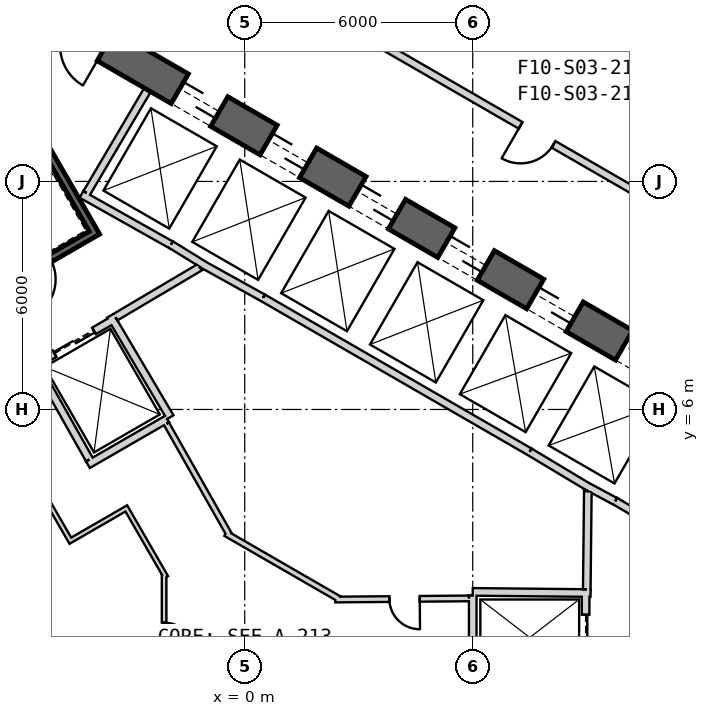
"""IFC4 building model, lengths in metres.
Left out: names, types, materials, properties, quantities, classifications, styles, units other than length and angle.
Written with IfcOpenShell. Run it as: python <this file> out.ifc"""

import sys

from ifc_helpers import new_model, si_unit, direction, frame, frame_2d, origin, place, context, subcontext, project, spatial, rectangle, extrude, element, fill, save


model = new_model("IFC4")
c1 = context("Model", 3, precision=1e-05, world=origin(), true_north=direction((0.0, 1.0)))
c2 = subcontext(c1, "Body", "Model", "MODEL_VIEW")
j1 = project(units=[si_unit("LENGTHUNIT", "METRE"), si_unit("PLANEANGLEUNIT", "RADIAN")], contexts=[c1])
p1 = place(None, origin())
s1 = spatial("IfcSite", under=j1, at=p1, CompositionType="ELEMENT")
p2 = place(p1, origin())
s2 = spatial("IfcBuilding", under=s1, at=p2, CompositionType="ELEMENT")
p3 = place(p2, frame((0.0, 0.0, 82.4)))
s3 = spatial("IfcBuildingStorey", under=s2, at=p3, CompositionType="ELEMENT", Elevation=82.4)
p4 = place(p3, frame((19.475, 2.208, 0.0), z_axis=(0.0, 0.0, 1.0), x_axis=(-0.866028369851, 0.499994862586, 0.0)))
e1 = element("IfcWall", 1, at=p4, inside=s3, PredefinedType="SHEAR", context=c2, shape_type="SweptSolid", body=[
    extrude(rectangle(XDim=31.523, YDim=0.9, at=frame_2d((15.762, 0.0))), origin(), (0.0, 0.0, 1.0), 4.1),
])
p5 = place(p4, frame((7.062, 0.0, 0.0)))
e2 = element("IfcOpeningElement", 2, at=p5, cuts=e1, PredefinedType="OPENING", context=c2, shape_type="SweptSolid", body=[
    extrude(rectangle(XDim=1.2, YDim=2.4, at=frame_2d((0.6, 1.2))), frame((0.0, 0.46, 0.0), z_axis=(0.0, -1.0, 0.0), x_axis=(1.0, 0.0, 0.0)), (0.0, 0.0, 1.0), 0.92),
])
p6 = place(p4, frame((9.762, 0.0, 0.0)))
e3 = element("IfcOpeningElement", 3, at=p6, cuts=e1, PredefinedType="OPENING", context=c2, shape_type="SweptSolid", body=[
    extrude(rectangle(XDim=1.2, YDim=2.4, at=frame_2d((0.6, 1.2))), frame((0.0, 0.46, 0.0), z_axis=(0.0, -1.0, 0.0), x_axis=(1.0, 0.0, 0.0)), (0.0, 0.0, 1.0), 0.92),
])
p7 = place(p4, frame((12.462, 0.0, 0.0)))
e4 = element("IfcOpeningElement", 4, at=p7, cuts=e1, PredefinedType="OPENING", context=c2, shape_type="SweptSolid", body=[
    extrude(rectangle(XDim=1.2, YDim=2.4, at=frame_2d((0.6, 1.2))), frame((0.0, 0.46, 0.0), z_axis=(0.0, -1.0, 0.0), x_axis=(1.0, 0.0, 0.0)), (0.0, 0.0, 1.0), 0.92),
])
p8 = place(p4, frame((15.162, 0.0, 0.0)))
e5 = element("IfcOpeningElement", 5, at=p8, cuts=e1, PredefinedType="OPENING", context=c2, shape_type="SweptSolid", body=[
    extrude(rectangle(XDim=1.2, YDim=2.4, at=frame_2d((0.6, 1.2))), frame((0.0, 0.46, 0.0), z_axis=(0.0, -1.0, 0.0), x_axis=(1.0, 0.0, 0.0)), (0.0, 0.0, 1.0), 0.92),
])
p9 = place(p4, frame((17.862, 0.0, 0.0)))
e6 = element("IfcOpeningElement", 6, at=p9, cuts=e1, PredefinedType="OPENING", context=c2, shape_type="SweptSolid", body=[
    extrude(rectangle(XDim=1.2, YDim=2.4, at=frame_2d((0.6, 1.2))), frame((0.0, 0.46, 0.0), z_axis=(0.0, -1.0, 0.0), x_axis=(1.0, 0.0, 0.0)), (0.0, 0.0, 1.0), 0.92),
])
p10 = place(p4, frame((20.562, 0.0, 0.0)))
e7 = element("IfcOpeningElement", 7, at=p10, cuts=e1, PredefinedType="OPENING", context=c2, shape_type="SweptSolid", body=[
    extrude(rectangle(XDim=1.2, YDim=2.4, at=frame_2d((0.6, 1.2))), frame((0.0, 0.46, 0.0), z_axis=(0.0, -1.0, 0.0), x_axis=(1.0, 0.0, 0.0)), (0.0, 0.0, 1.0), 0.92),
])
p11 = place(p4, frame((23.262, 0.0, 0.0)))
e8 = element("IfcOpeningElement", 8, at=p11, cuts=e1, PredefinedType="OPENING", context=c2, shape_type="SweptSolid", body=[
    extrude(rectangle(XDim=1.2, YDim=2.4, at=frame_2d((0.6, 1.2))), frame((0.0, 0.46, 0.0), z_axis=(0.0, -1.0, 0.0), x_axis=(1.0, 0.0, 0.0)), (0.0, 0.0, 1.0), 0.92),
])
p12 = place(p4, frame((3.612, 0.0, 0.0)))
e9 = element("IfcOpeningElement", 9, at=p12, cuts=e1, PredefinedType="OPENING", context=c2, shape_type="SweptSolid", body=[
    extrude(rectangle(XDim=1.2, YDim=2.4, at=frame_2d((0.6, 1.2))), frame((0.0, 0.46, 0.0), z_axis=(0.0, -1.0, 0.0), x_axis=(1.0, 0.0, 0.0)), (0.0, 0.0, 1.0), 0.92),
])
p13 = place(p4, frame((26.712, 0.0, 0.0)))
e10 = element("IfcOpeningElement", 10, at=p13, cuts=e1, PredefinedType="OPENING", context=c2, shape_type="SweptSolid", body=[
    extrude(rectangle(XDim=1.2, YDim=2.4, at=frame_2d((0.6, 1.2))), frame((0.0, 0.46, 0.0), z_axis=(0.0, -1.0, 0.0), x_axis=(1.0, 0.0, 0.0)), (0.0, 0.0, 1.0), 0.92),
])
p14 = place(p3, frame((7.497, 4.886, 0.0), z_axis=(0.0, 0.0, 1.0), x_axis=(-0.866030989016, 0.499990325971, 0.0)))
e11 = element("IfcWall", 11, at=p14, inside=s3, PredefinedType="PLUMBINGWALL", context=c2, shape_type="SweptSolid", body=[
    extrude(rectangle(XDim=8.1, YDim=0.2, at=frame_2d((4.05, 0.0))), origin(), (0.0, 0.0, 1.0), 3.8),
])
p15 = place(p3, frame((12.073, 2.211, 0.0), z_axis=(0.0, 0.0, 1.0), x_axis=(-0.860438357912, 0.509554542943, 0.0)))
e12 = element("IfcWall", 12, at=p15, inside=s3, PredefinedType="PLUMBINGWALL", context=c2, shape_type="SweptSolid", body=[
    extrude(rectangle(XDim=2.7, YDim=0.2, at=frame_2d((1.35, 0.0))), origin(), (0.0, 0.0, 1.0), 3.8),
])
p16 = place(p3, frame((9.748, 3.583, 0.0), z_axis=(0.0, 0.0, 1.0), x_axis=(-0.880917147855, 0.473270513147, 0.0)))
e13 = element("IfcWall", 13, at=p16, inside=s3, PredefinedType="PLUMBINGWALL", context=c2, shape_type="SweptSolid", body=[
    extrude(rectangle(XDim=0.878, YDim=0.2, at=frame_2d((0.439, 0.0))), origin(), (0.0, 0.0, 1.0), 3.8),
])
p17 = place(p3, frame((9.079, 3.937, 0.0), z_axis=(0.0, 0.0, 1.0), x_axis=(-0.857516281273, 0.51445682749, 0.0)))
e14 = element("IfcWall", 14, at=p17, inside=s3, PredefinedType="PLUMBINGWALL", context=c2, shape_type="SweptSolid", body=[
    extrude(rectangle(XDim=1.845, YDim=0.2, at=frame_2d((0.922, 0.0))), origin(), (0.0, 0.0, 1.0), 3.8),
])
p18 = place(p3, frame((-1.941, 10.339, 0.0), z_axis=(0.0, 0.0, 1.0), x_axis=(0.850216889117, -0.526432561171, 0.0)))
e15 = element("IfcWall", 15, at=p18, inside=s3, PredefinedType="PLUMBINGWALL", context=c2, shape_type="SweptSolid", body=[
    extrude(rectangle(XDim=1.078, YDim=0.2, at=frame_2d((0.539, 0.0))), origin(), (0.0, 0.0, 1.0), 3.8),
])
p19 = place(p3, frame((0.483, 8.936, 0.0), z_axis=(0.0, 0.0, 1.0), x_axis=(-0.874269620932, 0.485440655401, 0.0)))
e16 = element("IfcWall", 16, at=p19, inside=s3, PredefinedType="PLUMBINGWALL", context=c2, shape_type="SweptSolid", body=[
    extrude(rectangle(XDim=1.845, YDim=0.2, at=frame_2d((0.922, 0.0))), origin(), (0.0, 0.0, 1.0), 3.8),
])
p20 = place(p3, frame((-4.296, 11.659, 0.0), z_axis=(0.0, 0.0, 1.0), x_axis=(0.871534483978, -0.490334215854, 0.0)))
e17 = element("IfcWall", 17, at=p20, inside=s3, PredefinedType="PLUMBINGWALL", context=c2, shape_type="SweptSolid", body=[
    extrude(rectangle(XDim=2.7, YDim=0.2, at=frame_2d((1.35, 0.0))), origin(), (0.0, 0.0, 1.0), 3.8),
])
p21 = place(p3, frame((-4.158, 11.696, 0.0), z_axis=(0.0, 0.0, 1.0), x_axis=(0.508018930956, 0.861345903683, 0.0)))
e18 = element("IfcWall", 18, at=p21, inside=s3, PredefinedType="PLUMBINGWALL", context=c2, shape_type="SweptSolid", body=[
    extrude(rectangle(XDim=3.15, YDim=0.2, at=frame_2d((1.575, 0.0))), origin(), (0.0, 0.0, 1.0), 3.8),
])
p22 = place(p3, frame((8.97, 1.2, 0.0), z_axis=(0.0, 0.0, 1.0), x_axis=(0.0, -1.0, 0.0)))
e19 = element("IfcWall", 19, at=p22, inside=s3, PredefinedType="PLUMBINGWALL", context=c2, shape_type="SweptSolid", body=[
    extrude(rectangle(XDim=2.4, YDim=0.2, at=frame_2d((1.2, 0.0))), origin(), (0.0, 0.0, 1.0), 3.8),
])
p23 = place(p22, frame((0.6, 0.0, 0.0)))
e20 = element("IfcOpeningElement", 20, at=p23, cuts=e19, PredefinedType="OPENING", context=c2, shape_type="SweptSolid", body=[
    extrude(rectangle(XDim=1.2, YDim=2.4, at=frame_2d((0.6, 1.2))), frame((0.0, 0.11, 0.0), z_axis=(0.0, -1.0, 0.0), x_axis=(1.0, 0.0, 0.0)), (0.0, 0.0, 1.0), 0.22),
])
p24 = place(p3, frame((6.0, 1.2, 0.0), z_axis=(0.0, 0.0, 1.0), x_axis=(0.999949988, -0.010001074852, 0.0)))
e21 = element("IfcWall", 21, at=p24, inside=s3, PredefinedType="PLUMBINGWALL", context=c2, shape_type="SweptSolid", body=[
    extrude(rectangle(XDim=3.1, YDim=0.2, at=frame_2d((1.55, 0.0))), origin(), (0.0, 0.0, 1.0), 3.8),
])
p25 = place(p3, frame((6.0, -1.1, 0.0), z_axis=(0.0, 0.0, 1.0), x_axis=(0.0, 1.0, 0.0)))
e22 = element("IfcWall", 22, at=p25, inside=s3, PredefinedType="PLUMBINGWALL", context=c2, shape_type="SweptSolid", body=[
    extrude(rectangle(XDim=2.205, YDim=0.2, at=frame_2d((1.102, 0.0))), origin(), (0.0, 0.0, 1.0), 3.8),
])
p26 = place(p3, frame((-7.854, 17.405, -0.3), z_axis=(0.0, 0.0, 1.0), x_axis=(0.499997992926, -0.866026562566, 0.0)))
e23 = element("IfcWall", 23, at=p26, inside=s3, PredefinedType="SHEAR", context=c2, shape_type="SweptSolid", body=[
    extrude(rectangle(XDim=7.9, YDim=0.2, at=frame_2d((3.95, 0.0))), origin(), (0.0, 0.0, 1.0), 4.1),
])
p27 = place(p3, frame((-7.159, 8.8, -0.3), z_axis=(0.0, 0.0, 1.0), x_axis=(0.866047807691, 0.499961193289, 0.0)))
e24 = element("IfcWall", 24, at=p27, inside=s3, PredefinedType="SHEAR", context=c2, shape_type="SweptSolid", body=[
    extrude(rectangle(XDim=3.6, YDim=0.2, at=frame_2d((1.8, 0.0))), origin(), (0.0, 0.0, 1.0), 4.1),
])
p28 = place(p27, frame((1.25, 0.0, 0.3)))
e25 = element("IfcOpeningElement", 25, at=p28, cuts=e24, PredefinedType="OPENING", context=c2, shape_type="SweptSolid", body=[
    extrude(rectangle(XDim=1.1, YDim=2.1, at=frame_2d((0.55, 1.05))), frame((0.0, 0.11, 0.0), z_axis=(0.0, -1.0, 0.0), x_axis=(1.0, 0.0, 0.0)), (0.0, 0.0, 1.0), 0.22),
])
p29 = place(p3, frame((-5.524, 7.168, 0.0), z_axis=(0.0, 0.0, 1.0), x_axis=(0.866024647952, 0.500001309137, 0.0)))
e26 = element("IfcWall", 26, at=p29, inside=s3, PredefinedType="PLUMBINGWALL", context=c2, shape_type="SweptSolid", body=[
    extrude(rectangle(XDim=2.4, YDim=0.2, at=frame_2d((1.2, 0.0))), origin(), (0.0, 0.0, 1.0), 3.8),
])
p30 = place(p29, frame((0.6, 0.0, 0.0)))
e27 = element("IfcOpeningElement", 27, at=p30, cuts=e26, PredefinedType="OPENING", context=c2, shape_type="SweptSolid", body=[
    extrude(rectangle(XDim=1.2, YDim=2.4, at=frame_2d((0.6, 1.2))), frame((0.0, 0.11, 0.0), z_axis=(0.0, -1.0, 0.0), x_axis=(1.0, 0.0, 0.0)), (0.0, 0.0, 1.0), 0.22),
])
p31 = place(p3, frame((-3.538, 8.465, 0.0), z_axis=(0.0, 0.0, 1.0), x_axis=(0.508647062354, -0.860975125052, 0.0)))
e28 = element("IfcWall", 28, at=p31, inside=s3, PredefinedType="PLUMBINGWALL", context=c2, shape_type="SweptSolid", body=[
    extrude(rectangle(XDim=3.1, YDim=0.2, at=frame_2d((1.55, 0.0))), origin(), (0.0, 0.0, 1.0), 3.8),
])
p32 = place(p3, frame((-2.043, 5.748, 0.0), z_axis=(0.0, 0.0, 1.0), x_axis=(-0.866035096217, -0.499983211839, 0.0)))
e29 = element("IfcWall", 29, at=p32, inside=s3, PredefinedType="PLUMBINGWALL", context=c2, shape_type="SweptSolid", body=[
    extrude(rectangle(XDim=2.404, YDim=0.2, at=frame_2d((1.202, 0.0))), origin(), (0.0, 0.0, 1.0), 3.8),
])
p33 = place(p3, frame((-5.562, 7.296, 0.0), z_axis=(0.0, 0.0, 1.0), x_axis=(0.49134651263, -0.870964180966, 0.0)))
e30 = element("IfcWall", 30, at=p33, inside=s3, PredefinedType="PLUMBINGWALL", context=c2, shape_type="SweptSolid", body=[
    extrude(rectangle(XDim=3.0, YDim=0.2, at=frame_2d((1.5, 0.0))), origin(), (0.0, 0.0, 1.0), 3.8),
])
p34 = place(p3, frame((9.001, 1.27, 0.0), z_axis=(0.0, 0.0, 1.0), x_axis=(0.010784614026, 0.999941844359, 0.0)))
e31 = element("IfcWall", 31, at=p34, inside=s3, PredefinedType="PARTITIONING", context=c2, shape_type="SweptSolid", body=[
    extrude(rectangle(XDim=2.581, YDim=0.2, at=frame_2d((1.291, 0.0))), origin(), (0.0, 0.0, 1.0), 3.8),
])
p35 = place(p3, frame((-1.18, 9.744, 0.0), z_axis=(0.0, 0.0, 1.0), x_axis=(-0.860615607571, -0.509255118781, 0.0)))
e32 = element("IfcWall", 32, at=p35, inside=s3, PredefinedType="PARTITIONING", context=c2, shape_type="SweptSolid", body=[
    extrude(rectangle(XDim=2.581, YDim=0.2, at=frame_2d((1.29, 0.0))), origin(), (0.0, 0.0, 1.0), 3.8),
])
p36 = place(p3, frame((2.384, 0.999, 0.0), z_axis=(0.0, 0.0, 1.0), x_axis=(0.999964703434, 0.008401897723, 0.0)))
e33 = element("IfcWall", 33, at=p36, inside=s3, PredefinedType="PLUMBINGWALL", context=c2, shape_type="SweptSolid", body=[
    extrude(rectangle(XDim=3.516, YDim=0.15, at=frame_2d((1.758, 0.0))), origin(), (0.0, 0.0, 1.0), 3.8),
])
p37 = place(p36, frame((1.422, 0.0, 0.0)))
e34 = element("IfcOpeningElement", 34, at=p37, cuts=e33, PredefinedType="OPENING", context=c2, shape_type="SweptSolid", body=[
    extrude(rectangle(XDim=0.8, YDim=2.1, at=frame_2d((0.4, 1.05))), frame((0.0, 0.085, 0.0), z_axis=(0.0, -1.0, 0.0), x_axis=(1.0, 0.0, 0.0)), (0.0, 0.0, 1.0), 0.17),
])
p38 = place(p3, frame((-0.5, 2.739, 0.0), z_axis=(0.0, 0.0, 1.0), x_axis=(0.866029020252, -0.499993736042, 0.0)))
e35 = element("IfcWall", 35, at=p38, inside=s3, PredefinedType="PLUMBINGWALL", context=c2, shape_type="SweptSolid", body=[
    extrude(rectangle(XDim=3.454, YDim=0.15, at=frame_2d((1.727, 0.0))), origin(), (0.0, 0.0, 1.0), 3.8),
])
p39 = place(p3, frame((-2.059, 5.624, 0.0), z_axis=(0.0, 0.0, 1.0), x_axis=(0.49265005812, -0.870227510617, 0.0)))
e36 = element("IfcWall", 36, at=p39, inside=s3, PredefinedType="PLUMBINGWALL", context=c2, shape_type="SweptSolid", body=[
    extrude(rectangle(XDim=3.365, YDim=0.15, at=frame_2d((1.683, 0.0))), origin(), (0.0, 0.0, 1.0), 3.8),
])
p40 = place(p3, frame((-4.558, 2.495, 0.0), z_axis=(0.0, 0.0, 1.0), x_axis=(-0.499991792115, 0.866030142557, 0.0)))
e37 = element("IfcWall", 37, at=p40, inside=s3, PredefinedType="PARTITIONING", context=c2, shape_type="SweptSolid", body=[
    extrude(rectangle(XDim=3.06, YDim=0.12, at=frame_2d((1.53, 0.0))), origin(), (0.0, 0.0, 1.0), 3.8),
])
p41 = place(p3, frame((-3.064, 3.427, 0.0), z_axis=(0.0, 0.0, 1.0), x_axis=(-0.866087547558, -0.499892348375, 0.0)))
e38 = element("IfcWall", 38, at=p41, inside=s3, PredefinedType="PARTITIONING", context=c2, shape_type="SweptSolid", body=[
    extrude(rectangle(XDim=1.7, YDim=0.12, at=frame_2d((0.85, 0.0))), origin(), (0.0, 0.0, 1.0), 3.8),
])
p42 = place(p3, frame((-2.07, 1.585, 0.0), z_axis=(0.0, 0.0, 1.0), x_axis=(-0.499937346687, 0.86606157367, 0.0)))
e39 = element("IfcWall", 39, at=p42, inside=s3, PredefinedType="PARTITIONING", context=c2, shape_type="SweptSolid", body=[
    extrude(rectangle(XDim=2.032, YDim=0.12, at=frame_2d((1.016, 0.0))), origin(), (0.0, 0.0, 1.0), 3.8),
])
p43 = place(p3, frame((-2.122, -1.779, 0.0), z_axis=(0.0, 0.0, 1.0), x_axis=(0.0, 1.0, 0.0)))
e40 = element("IfcWall", 40, at=p43, inside=s3, PredefinedType="PARTITIONING", context=c2, shape_type="SweptSolid", body=[
    extrude(rectangle(XDim=3.435, YDim=0.12, at=frame_2d((1.718, 0.0))), origin(), (0.0, 0.0, 1.0), 3.8),
])
p44 = place(p43, frame((1.37, 0.0, 0.0)))
e41 = element("IfcOpeningElement", 41, at=p44, cuts=e40, PredefinedType="OPENING", context=c2, shape_type="SweptSolid", body=[
    extrude(rectangle(XDim=0.8, YDim=2.1, at=frame_2d((0.4, 1.05))), frame((0.0, 0.07, 0.0), z_axis=(0.0, -1.0, 0.0), x_axis=(1.0, 0.0, 0.0)), (0.0, 0.0, 1.0), 0.14),
])
p45 = place(p3, frame((21.944, 4.998, 0.0), z_axis=(0.0, 0.0, 1.0), x_axis=(-0.866025615729, 0.499999632902, 0.0)))
e42 = element("IfcWall", 42, at=p45, inside=s3, PredefinedType="PARTITIONING", context=c2, shape_type="SweptSolid", body=[
    extrude(rectangle(XDim=32.811, YDim=0.2, at=frame_2d((16.405, 0.0))), origin(), (0.0, 0.0, 1.0), 2.98),
])
p46 = place(p45, frame((15.955, 0.0, 0.0)))
e43 = element("IfcOpeningElement", 43, at=p46, cuts=e42, PredefinedType="OPENING", context=c2, shape_type="SweptSolid", body=[
    extrude(rectangle(XDim=1.0, YDim=2.1, at=frame_2d((0.5, 1.05))), frame((0.0, 0.11, 0.0), z_axis=(0.0, -1.0, 0.0), x_axis=(1.0, 0.0, 0.0)), (0.0, 0.0, 1.0), 0.22),
])
p47 = place(p23, origin())
e44 = element("IfcDoor", 44, at=p47, inside=s3, OperationType="SLIDING_TO_LEFT", PredefinedType="USERDEFINED", context=c2, shape_type="SweptSolid", body=[
    extrude(rectangle(XDim=1.2, YDim=2.4, at=frame_2d((0.6, 1.2))), frame((0.0, 0.025, 0.0), z_axis=(0.0, -1.0, 0.0), x_axis=(1.0, 0.0, 0.0)), (0.0, 0.0, 1.0), 0.05),
])
fill(e20, e44)
p48 = place(p30, origin())
e45 = element("IfcDoor", 45, at=p48, inside=s3, OperationType="SLIDING_TO_LEFT", PredefinedType="USERDEFINED", context=c2, shape_type="SweptSolid", body=[
    extrude(rectangle(XDim=1.2, YDim=2.4, at=frame_2d((0.6, 1.2))), frame((0.0, 0.025, 0.0), z_axis=(0.0, -1.0, 0.0), x_axis=(1.0, 0.0, 0.0)), (0.0, 0.0, 1.0), 0.05),
])
fill(e27, e45)
p49 = place(p37, origin())
e46 = element("IfcDoor", 46, at=p49, inside=s3, OperationType="SINGLE_SWING_RIGHT", PredefinedType="USERDEFINED", context=c2, shape_type="SweptSolid", body=[
    extrude(rectangle(XDim=0.8, YDim=2.1, at=frame_2d((0.4, 1.05))), frame((0.0, 0.025, 0.0), z_axis=(0.0, -1.0, 0.0), x_axis=(1.0, 0.0, 0.0)), (0.0, 0.0, 1.0), 0.05),
])
fill(e34, e46)
p50 = place(p44, origin())
e47 = element("IfcDoor", 47, at=p50, inside=s3, OperationType="SINGLE_SWING_LEFT", PredefinedType="USERDEFINED", context=c2, shape_type="SweptSolid", body=[
    extrude(rectangle(XDim=0.8, YDim=2.1, at=frame_2d((0.4, 1.05))), frame((0.0, 0.025, 0.0), z_axis=(0.0, -1.0, 0.0), x_axis=(1.0, 0.0, 0.0)), (0.0, 0.0, 1.0), 0.05),
])
fill(e41, e47)
p51 = place(p46, origin())
e48 = element("IfcDoor", 48, at=p51, inside=s3, OperationType="SINGLE_SWING_RIGHT", PredefinedType="USERDEFINED", context=c2, shape_type="SweptSolid", body=[
    extrude(rectangle(XDim=1.0, YDim=2.1, at=frame_2d((0.5, 1.05))), frame((0.0, 0.025, 0.0), z_axis=(0.0, -1.0, 0.0), x_axis=(1.0, 0.0, 0.0)), (0.0, 0.0, 1.0), 0.05),
])
fill(e43, e48)
p52 = place(p6, origin())
e49 = element("IfcDoor", 49, at=p52, inside=s3, OperationType="SLIDING_TO_LEFT", PredefinedType="USERDEFINED", context=c2, shape_type="SweptSolid", body=[
    extrude(rectangle(XDim=1.2, YDim=2.4, at=frame_2d((0.6, 1.2))), frame((0.0, 0.025, 0.0), z_axis=(0.0, -1.0, 0.0), x_axis=(1.0, 0.0, 0.0)), (0.0, 0.0, 1.0), 0.05),
])
fill(e3, e49)
p53 = place(p7, origin())
e50 = element("IfcDoor", 50, at=p53, inside=s3, OperationType="SLIDING_TO_LEFT", PredefinedType="USERDEFINED", context=c2, shape_type="SweptSolid", body=[
    extrude(rectangle(XDim=1.2, YDim=2.4, at=frame_2d((0.6, 1.2))), frame((0.0, 0.025, 0.0), z_axis=(0.0, -1.0, 0.0), x_axis=(1.0, 0.0, 0.0)), (0.0, 0.0, 1.0), 0.05),
])
fill(e4, e50)
p54 = place(p8, origin())
e51 = element("IfcDoor", 51, at=p54, inside=s3, OperationType="SLIDING_TO_LEFT", PredefinedType="USERDEFINED", context=c2, shape_type="SweptSolid", body=[
    extrude(rectangle(XDim=1.2, YDim=2.4, at=frame_2d((0.6, 1.2))), frame((0.0, 0.025, 0.0), z_axis=(0.0, -1.0, 0.0), x_axis=(1.0, 0.0, 0.0)), (0.0, 0.0, 1.0), 0.05),
])
fill(e5, e51)
p55 = place(p9, origin())
e52 = element("IfcDoor", 52, at=p55, inside=s3, OperationType="SLIDING_TO_LEFT", PredefinedType="USERDEFINED", context=c2, shape_type="SweptSolid", body=[
    extrude(rectangle(XDim=1.2, YDim=2.4, at=frame_2d((0.6, 1.2))), frame((0.0, 0.025, 0.0), z_axis=(0.0, -1.0, 0.0), x_axis=(1.0, 0.0, 0.0)), (0.0, 0.0, 1.0), 0.05),
])
fill(e6, e52)
p56 = place(p10, origin())
e53 = element("IfcDoor", 53, at=p56, inside=s3, OperationType="SLIDING_TO_LEFT", PredefinedType="USERDEFINED", context=c2, shape_type="SweptSolid", body=[
    extrude(rectangle(XDim=1.2, YDim=2.4, at=frame_2d((0.6, 1.2))), frame((0.0, 0.025, 0.0), z_axis=(0.0, -1.0, 0.0), x_axis=(1.0, 0.0, 0.0)), (0.0, 0.0, 1.0), 0.05),
])
fill(e7, e53)
p57 = place(p11, origin())
e54 = element("IfcDoor", 54, at=p57, inside=s3, OperationType="SLIDING_TO_LEFT", PredefinedType="USERDEFINED", context=c2, shape_type="SweptSolid", body=[
    extrude(rectangle(XDim=1.2, YDim=2.4, at=frame_2d((0.6, 1.2))), frame((0.0, 0.025, 0.0), z_axis=(0.0, -1.0, 0.0), x_axis=(1.0, 0.0, 0.0)), (0.0, 0.0, 1.0), 0.05),
])
fill(e8, e54)
save(model, sys.argv[1])
